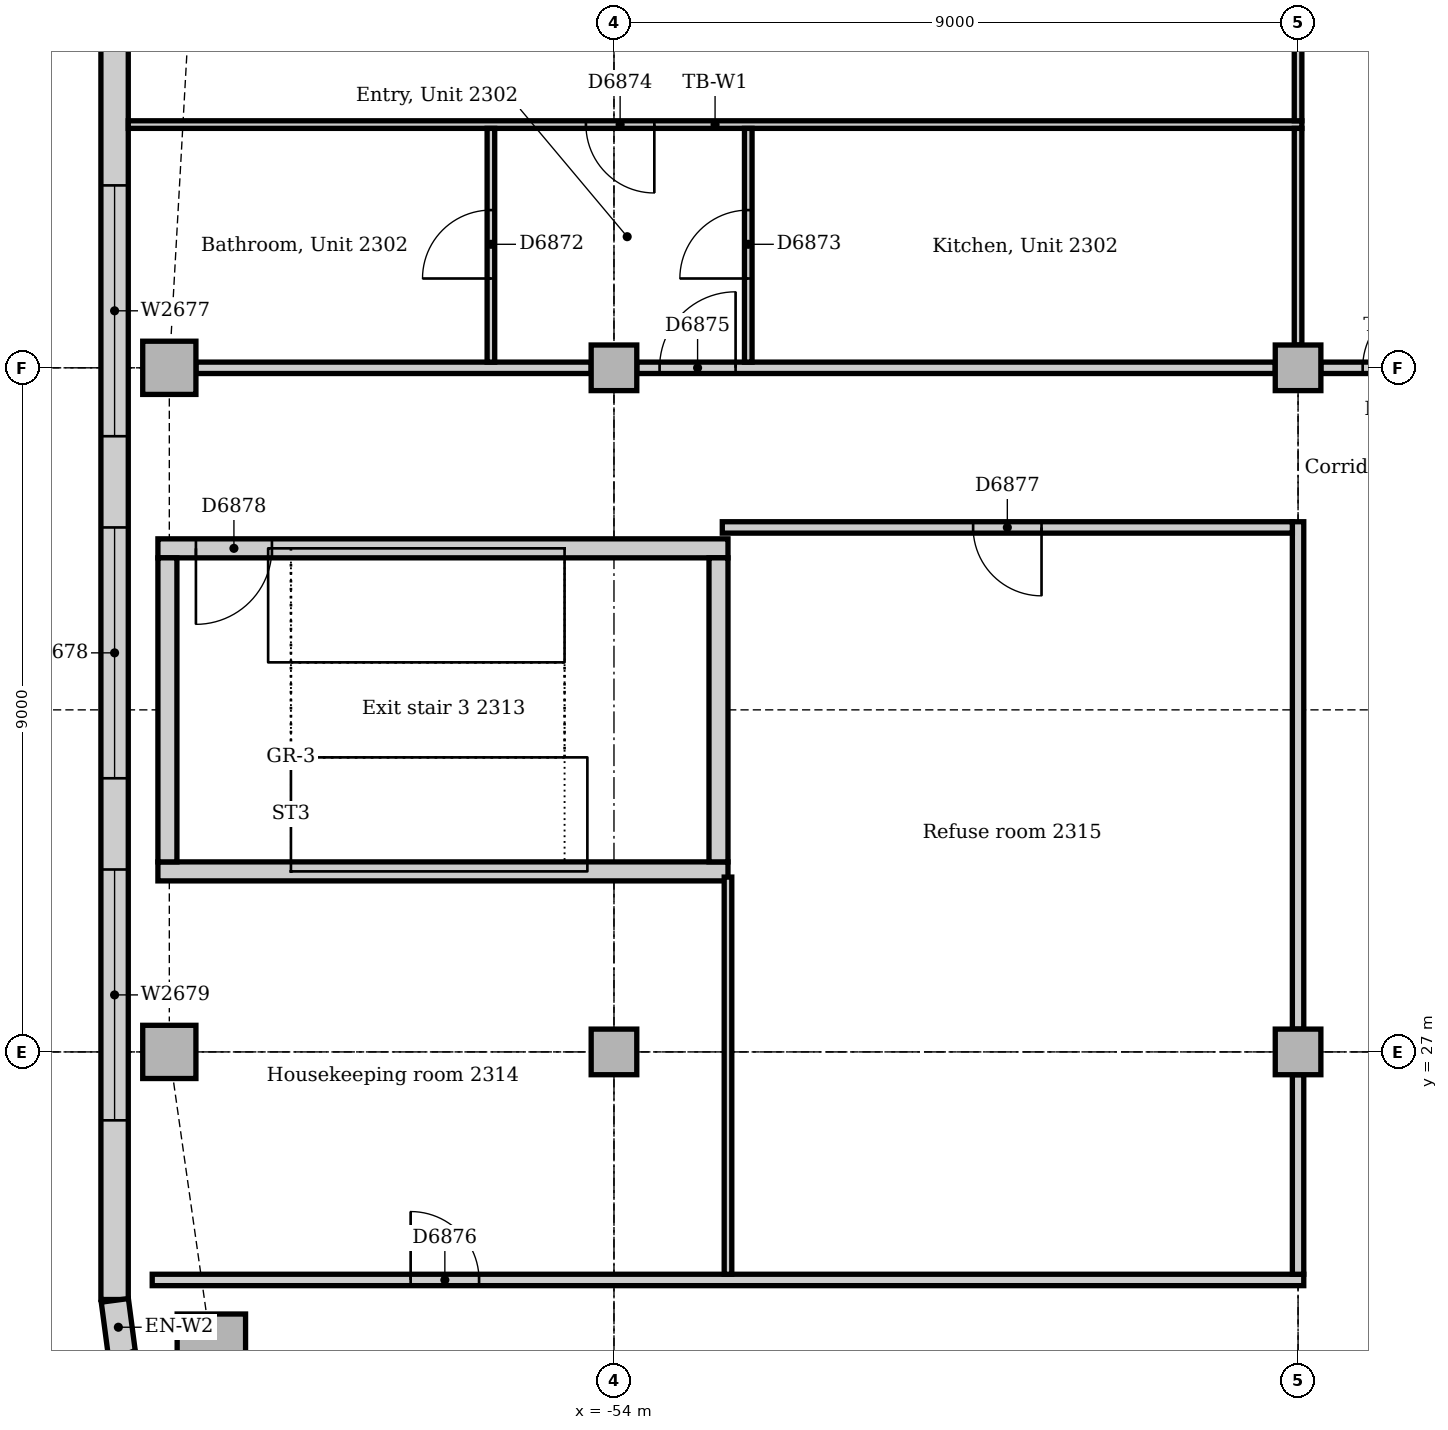
"""IFC4 building model, lengths in metres.
Left out: names, types, materials, properties, quantities, classifications, styles, units other than length and angle.
Written with IfcOpenShell. Run it as: python <this file> out.ifc"""

import sys

from ifc_helpers import new_model, si_unit, direction, frame, frame_2d, origin, origin_2d, place, context, subcontext, project, spatial, rectangle, extrude, element, fill, save


model = new_model("IFC4")
c1 = context("Model", 3, precision=1e-05, world=origin(), true_north=direction((0.0, 1.0)))
c2 = subcontext(c1, "Body", "Model", "MODEL_VIEW")
j1 = project(units=[si_unit("LENGTHUNIT", "METRE"), si_unit("PLANEANGLEUNIT", "RADIAN")], contexts=[c1])
p1 = place(None, origin())
s1 = spatial("IfcSite", under=j1, at=p1, CompositionType="ELEMENT")
p2 = place(p1, origin())
s2 = spatial("IfcBuilding", under=s1, at=p2, CompositionType="ELEMENT")
p3 = place(p2, frame((0.0, 0.0, 100.0)))
s3 = spatial("IfcBuildingStorey", under=s2, at=p3, CompositionType="ELEMENT", Elevation=100.0)
p4 = place(p3, frame((-60.0, 29.375, 0.0), z_axis=(0.0, 0.0, 1.0), x_axis=(1.0, 0.0, 0.0)))
e1 = element("IfcWall", 1, at=p4, inside=s3, PredefinedType="SOLIDWALL", context=c2, shape_type="SweptSolid", body=[
    extrude(rectangle(XDim=7.5, YDim=0.25, at=frame_2d((3.75, 0.0))), origin(), (0.0, 0.0, 1.0), 4.0),
])
p5 = place(p3, frame((-52.5, 33.625, 0.0), z_axis=(0.0, 0.0, 1.0), x_axis=(-1.0, 0.0, 0.0)))
e2 = element("IfcWall", 2, at=p5, inside=s3, PredefinedType="SOLIDWALL", context=c2, shape_type="SweptSolid", body=[
    extrude(rectangle(XDim=7.5, YDim=0.25, at=frame_2d((3.75, 0.0))), origin(), (0.0, 0.0, 1.0), 4.0),
])
p6 = place(p5, frame((6.0, 0.0, 0.0)))
e3 = element("IfcOpeningElement", 3, at=p6, cuts=e2, PredefinedType="OPENING", context=c2, shape_type="SweptSolid", body=[
    extrude(rectangle(XDim=1.0, YDim=2.1, at=frame_2d((0.5, 1.05))), frame((0.0, 0.135, 0.0), z_axis=(0.0, -1.0, 0.0), x_axis=(1.0, 0.0, 0.0)), (0.0, 0.0, 1.0), 0.27),
])
for number, where, z_axis, x_axis in (
    (4, (-52.625, 29.5, 0.0), (0.0, 0.0, 1.0), (0.0, 1.0, 0.0)),
    (5, (-59.875, 33.5, 0.0), (0.0, 0.0, 1.0), (0.0, -1.0, 0.0)),
):
    element("IfcWall", number, at=place(p3, frame(where, z_axis=z_axis, x_axis=x_axis)), inside=s3, PredefinedType="SOLIDWALL", context=c2, shape_type="SweptSolid", body=[
        extrude(rectangle(XDim=4.0, YDim=0.25, at=frame_2d((2.0, 0.0))), origin(), (0.0, 0.0, 1.0), 4.0),
    ])
p7 = place(p3, frame((-59.297, 23.102, -0.15), z_axis=(0.0, 0.0, 1.0), x_axis=(1.0, 0.0, 0.0)))
e6 = element("IfcColumn", 6, at=p7, inside=s3, PredefinedType="COLUMN", context=c2, shape_type="SweptSolid", body=[
    extrude(rectangle(XDim=0.9, YDim=0.9, at=origin_2d()), origin(), (0.0, 0.0, 1.0), 4.0),
])
for number, where, z_axis, x_axis in (
    (7, (-59.85, 27.0, -0.15), (0.0, 0.0, 1.0), (1.0, 0.0, 0.0)),
    (8, (-59.85, 36.0, -0.15), (0.0, 0.0, 1.0), (1.0, 0.0, 0.0)),
):
    element("IfcColumn", number, at=place(p3, frame(where, z_axis=z_axis, x_axis=x_axis)), inside=s3, PredefinedType="COLUMN", context=c2, shape_type="SweptSolid", body=[
        extrude(rectangle(XDim=0.7, YDim=0.7, at=origin_2d()), origin(), (0.0, 0.0, 1.0), 4.0),
    ])
for number, where, z_axis, x_axis in (
    (9, (-54.0, 27.0, 0.0), (0.0, 0.0, 1.0), (1.0, 0.0, 0.0)),
    (10, (-54.0, 36.0, 0.0), (0.0, 0.0, 1.0), (1.0, 0.0, 0.0)),
    (11, (-45.0, 27.0, 0.0), (0.0, 0.0, 1.0), (1.0, 0.0, 0.0)),
    (12, (-45.0, 36.0, 0.0), (0.0, 0.0, 1.0), (1.0, 0.0, 0.0)),
):
    element("IfcColumn", number, at=place(p3, frame(where, z_axis=z_axis, x_axis=x_axis)), inside=s3, PredefinedType="COLUMN", context=c2, shape_type="SweptSolid", body=[
        extrude(rectangle(XDim=0.6, YDim=0.6, at=origin_2d()), origin(), (0.0, 0.0, 1.0), 3.85),
    ])
p8 = place(p3, frame((-60.57, 45.257, 0.0), z_axis=(0.0, 0.0, 1.0), x_axis=(0.0, -1.0, 0.0)))
e13 = element("IfcWall", 13, at=p8, inside=s3, PredefinedType="STANDARD", context=c2, shape_type="SweptSolid", body=[
    extrude(rectangle(XDim=21.515, YDim=0.36, at=frame_2d((10.757, 0.0))), origin(), (0.0, 0.0, 1.0), 3.85),
])
p9 = place(p8, frame((3.107, 0.0, 0.0)))
e14 = element("IfcOpeningElement", 14, at=p9, cuts=e13, PredefinedType="OPENING", context=c2, shape_type="SweptSolid", body=[
    extrude(rectangle(XDim=1.8, YDim=2.4, at=frame_2d((0.9, 1.2))), frame((0.0, 0.19, 0.0), z_axis=(0.0, -1.0, 0.0), x_axis=(1.0, 0.0, 0.0)), (0.0, 0.0, 1.0), 0.38),
])
p10 = place(p8, frame((6.857, 0.0, 0.9)))
e15 = element("IfcOpeningElement", 15, at=p10, cuts=e13, PredefinedType="OPENING", context=c2, shape_type="SweptSolid", body=[
    extrude(rectangle(XDim=3.3, YDim=1.6, at=frame_2d((1.65, 0.8))), frame((0.0, 0.19, 0.0), z_axis=(0.0, -1.0, 0.0), x_axis=(1.0, 0.0, 0.0)), (0.0, 0.0, 1.0), 0.38),
])
p11 = place(p8, frame((11.357, 0.0, 0.9)))
e16 = element("IfcOpeningElement", 16, at=p11, cuts=e13, PredefinedType="OPENING", context=c2, shape_type="SweptSolid", body=[
    extrude(rectangle(XDim=3.3, YDim=1.6, at=frame_2d((1.65, 0.8))), frame((0.0, 0.19, 0.0), z_axis=(0.0, -1.0, 0.0), x_axis=(1.0, 0.0, 0.0)), (0.0, 0.0, 1.0), 0.38),
])
p12 = place(p8, frame((15.857, 0.0, 0.9)))
e17 = element("IfcOpeningElement", 17, at=p12, cuts=e13, PredefinedType="OPENING", context=c2, shape_type="SweptSolid", body=[
    extrude(rectangle(XDim=3.3, YDim=1.6, at=frame_2d((1.65, 0.8))), frame((0.0, 0.19, 0.0), z_axis=(0.0, -1.0, 0.0), x_axis=(1.0, 0.0, 0.0)), (0.0, 0.0, 1.0), 0.38),
])
p13 = place(p3, frame((-60.567, 23.731, 0.0), z_axis=(0.0, 0.0, 1.0), x_axis=(0.13055608231, -0.99144092581, 0.0)))
e18 = element("IfcWall", 18, at=p13, inside=s3, PredefinedType="STANDARD", context=c2, shape_type="SweptSolid", body=[
    extrude(rectangle(XDim=0.713, YDim=0.36, at=frame_2d((0.356, 0.0))), origin(), (0.0, 0.0, 1.0), 3.85),
])
p14 = place(p3, frame((-44.7, 36.0, 0.0), z_axis=(0.0, 0.0, 1.0), x_axis=(1.0, 0.0, 0.0)))
e19 = element("IfcWall", 19, at=p14, inside=s3, PredefinedType="PARTITIONING", context=c2, shape_type="SweptSolid", body=[
    extrude(rectangle(XDim=1.975, YDim=0.15, at=frame_2d((0.988, 0.0))), origin(), (0.0, 0.0, 1.0), 3.602),
])
p15 = place(p14, frame((0.55, 0.0, 0.0)))
e20 = element("IfcOpeningElement", 20, at=p15, cuts=e19, PredefinedType="OPENING", context=c2, shape_type="SweptSolid", body=[
    extrude(rectangle(XDim=0.9, YDim=2.1, at=frame_2d((0.45, 1.05))), frame((0.0, 0.085, 0.0), z_axis=(0.0, -1.0, 0.0), x_axis=(1.0, 0.0, 0.0)), (0.0, 0.0, 1.0), 0.17),
])
p16 = place(p3, frame((-53.7, 36.0, 0.0), z_axis=(0.0, 0.0, 1.0), x_axis=(1.0, 0.0, 0.0)))
e21 = element("IfcWall", 21, at=p16, inside=s3, PredefinedType="PARTITIONING", context=c2, shape_type="SweptSolid", body=[
    extrude(rectangle(XDim=8.4, YDim=0.15, at=frame_2d((4.2, 0.0))), origin(), (0.0, 0.0, 1.0), 3.262),
])
p17 = place(p16, frame((0.3, 0.0, 0.0)))
e22 = element("IfcOpeningElement", 22, at=p17, cuts=e21, PredefinedType="OPENING", context=c2, shape_type="SweptSolid", body=[
    extrude(rectangle(XDim=1.0, YDim=2.1, at=frame_2d((0.5, 1.05))), frame((0.0, 0.085, 0.0), z_axis=(0.0, -1.0, 0.0), x_axis=(1.0, 0.0, 0.0)), (0.0, 0.0, 1.0), 0.17),
])
p18 = place(p3, frame((-59.5, 36.0, 0.0), z_axis=(0.0, 0.0, 1.0), x_axis=(1.0, 0.0, 0.0)))
e23 = element("IfcWall", 23, at=p18, inside=s3, PredefinedType="PARTITIONING", context=c2, shape_type="SweptSolid", body=[
    extrude(rectangle(XDim=5.2, YDim=0.15, at=frame_2d((2.6, 0.0))), origin(), (0.0, 0.0, 1.0), 3.35),
])
p19 = place(p3, frame((-60.075, 24.0, 0.0), z_axis=(0.0, 0.0, 1.0), x_axis=(1.0, 0.0, 0.0)))
e24 = element("IfcWall", 24, at=p19, inside=s3, PredefinedType="PARTITIONING", context=c2, shape_type="SweptSolid", body=[
    extrude(rectangle(XDim=15.15, YDim=0.15, at=frame_2d((7.575, 0.0))), origin(), (0.0, 0.0, 1.0), 3.85),
])
p20 = place(p19, frame((3.4, 0.0, 0.0)))
e25 = element("IfcOpeningElement", 25, at=p20, cuts=e24, PredefinedType="OPENING", context=c2, shape_type="SweptSolid", body=[
    extrude(rectangle(XDim=0.9, YDim=2.1, at=frame_2d((0.45, 1.05))), frame((0.0, 0.085, 0.0), z_axis=(0.0, -1.0, 0.0), x_axis=(1.0, 0.0, 0.0)), (0.0, 0.0, 1.0), 0.17),
])
p21 = place(p3, frame((-45.0, 24.075, 0.0), z_axis=(0.0, 0.0, 1.0), x_axis=(0.0, 1.0, 0.0)))
e26 = element("IfcWall", 26, at=p21, inside=s3, PredefinedType="PARTITIONING", context=c2, shape_type="SweptSolid", body=[
    extrude(rectangle(XDim=2.625, YDim=0.15, at=frame_2d((1.312, 0.0))), origin(), (0.0, 0.0, 1.0), 3.362),
])
p22 = place(p3, frame((-45.0, 27.3, 0.0), z_axis=(0.0, 0.0, 1.0), x_axis=(0.0, 1.0, 0.0)))
e27 = element("IfcWall", 27, at=p22, inside=s3, PredefinedType="PARTITIONING", context=c2, shape_type="SweptSolid", body=[
    extrude(rectangle(XDim=6.675, YDim=0.15, at=frame_2d((3.337, 0.0))), origin(), (0.0, 0.0, 1.0), 3.362),
])
p23 = place(p3, frame((-52.575, 33.9, 0.0), z_axis=(0.0, 0.0, 1.0), x_axis=(1.0, 0.0, 0.0)))
e28 = element("IfcWall", 28, at=p23, inside=s3, PredefinedType="PARTITIONING", context=c2, shape_type="SweptSolid", body=[
    extrude(rectangle(XDim=7.5, YDim=0.15, at=frame_2d((3.75, 0.0))), origin(), (0.0, 0.0, 1.0), 3.85),
])
p24 = place(p23, frame((3.3, 0.0, 0.0)))
e29 = element("IfcOpeningElement", 29, at=p24, cuts=e28, PredefinedType="OPENING", context=c2, shape_type="SweptSolid", body=[
    extrude(rectangle(XDim=0.9, YDim=2.1, at=frame_2d((0.45, 1.05))), frame((0.0, 0.085, 0.0), z_axis=(0.0, -1.0, 0.0), x_axis=(1.0, 0.0, 0.0)), (0.0, 0.0, 1.0), 0.17),
])
p25 = place(p3, frame((-60.39, 39.2, 0.0), z_axis=(0.0, 0.0, 1.0), x_axis=(1.0, 0.0, 0.0)))
e30 = element("IfcWall", 30, at=p25, inside=s3, PredefinedType="PARTITIONING", context=c2, shape_type="SweptSolid", body=[
    extrude(rectangle(XDim=15.44, YDim=0.1, at=frame_2d((7.72, 0.0))), origin(), (0.0, 0.0, 1.0), 3.85),
])
p26 = place(p25, frame((6.021, 0.0, 0.0)))
e31 = element("IfcOpeningElement", 31, at=p26, cuts=e30, PredefinedType="OPENING", context=c2, shape_type="SweptSolid", body=[
    extrude(rectangle(XDim=0.9, YDim=2.1, at=frame_2d((0.45, 1.05))), frame((0.0, 0.06, 0.0), z_axis=(0.0, -1.0, 0.0), x_axis=(1.0, 0.0, 0.0)), (0.0, 0.0, 1.0), 0.12),
])
p27 = place(p3, frame((-45.0, 39.25, 0.0), z_axis=(0.0, 0.0, 1.0), x_axis=(0.0, 1.0, 0.0)))
e32 = element("IfcWall", 32, at=p27, inside=s3, PredefinedType="PARTITIONING", context=c2, shape_type="SweptSolid", body=[
    extrude(rectangle(XDim=6.8, YDim=0.1, at=frame_2d((3.4, 0.0))), origin(), (0.0, 0.0, 1.0), 3.362),
])
p28 = place(p3, frame((-45.0, 36.3, 0.0), z_axis=(0.0, 0.0, 1.0), x_axis=(0.0, 1.0, 0.0)))
e33 = element("IfcWall", 33, at=p28, inside=s3, PredefinedType="PARTITIONING", context=c2, shape_type="SweptSolid", body=[
    extrude(rectangle(XDim=2.85, YDim=0.1, at=frame_2d((1.425, 0.0))), origin(), (0.0, 0.0, 1.0), 3.362),
])
p29 = place(p3, frame((-52.5, 24.075, 0.0), z_axis=(0.0, 0.0, 1.0), x_axis=(0.0, 1.0, 0.0)))
e34 = element("IfcWall", 34, at=p29, inside=s3, PredefinedType="PARTITIONING", context=c2, shape_type="SweptSolid", body=[
    extrude(rectangle(XDim=5.225, YDim=0.1, at=frame_2d((2.612, 0.0))), origin(), (0.0, 0.0, 1.0), 3.85),
])
p30 = place(p3, frame((-55.619, 36.075, 0.0), z_axis=(0.0, 0.0, 1.0), x_axis=(0.0, 1.0, 0.0)))
e35 = element("IfcWall", 35, at=p30, inside=s3, PredefinedType="PARTITIONING", context=c2, shape_type="SweptSolid", body=[
    extrude(rectangle(XDim=3.075, YDim=0.1, at=frame_2d((1.538, 0.0))), origin(), (0.0, 0.0, 1.0), 3.85),
])
p31 = place(p30, frame((1.1, 0.0, 0.0)))
e36 = element("IfcOpeningElement", 36, at=p31, cuts=e35, PredefinedType="OPENING", context=c2, shape_type="SweptSolid", body=[
    extrude(rectangle(XDim=0.9, YDim=2.1, at=frame_2d((0.45, 1.05))), frame((0.0, 0.06, 0.0), z_axis=(0.0, -1.0, 0.0), x_axis=(1.0, 0.0, 0.0)), (0.0, 0.0, 1.0), 0.12),
])
p32 = place(p3, frame((-52.233, 36.075, 0.0), z_axis=(0.0, 0.0, 1.0), x_axis=(0.0, 1.0, 0.0)))
e37 = element("IfcWall", 37, at=p32, inside=s3, PredefinedType="PARTITIONING", context=c2, shape_type="SweptSolid", body=[
    extrude(rectangle(XDim=3.075, YDim=0.1, at=frame_2d((1.538, 0.0))), origin(), (0.0, 0.0, 1.0), 3.85),
])
p33 = place(p32, frame((1.1, 0.0, 0.0)))
e38 = element("IfcOpeningElement", 38, at=p33, cuts=e37, PredefinedType="OPENING", context=c2, shape_type="SweptSolid", body=[
    extrude(rectangle(XDim=0.9, YDim=2.1, at=frame_2d((0.45, 1.05))), frame((0.0, 0.06, 0.0), z_axis=(0.0, -1.0, 0.0), x_axis=(1.0, 0.0, 0.0)), (0.0, 0.0, 1.0), 0.12),
])
p34 = place(p10, origin())
e39 = element("IfcWindow", 39, at=p34, inside=s3, PartitioningType="SINGLE_PANEL", PredefinedType="WINDOW", context=c2, shape_type="SweptSolid", body=[
    extrude(rectangle(XDim=3.3, YDim=1.6, at=frame_2d((1.65, 0.8))), frame((0.0, 0.13, 0.0), z_axis=(0.0, -1.0, 0.0), x_axis=(1.0, 0.0, 0.0)), (0.0, 0.0, 1.0), 0.06),
])
fill(e15, e39)
p35 = place(p11, origin())
e40 = element("IfcWindow", 40, at=p35, inside=s3, PartitioningType="SINGLE_PANEL", PredefinedType="WINDOW", context=c2, shape_type="SweptSolid", body=[
    extrude(rectangle(XDim=3.3, YDim=1.6, at=frame_2d((1.65, 0.8))), frame((0.0, 0.13, 0.0), z_axis=(0.0, -1.0, 0.0), x_axis=(1.0, 0.0, 0.0)), (0.0, 0.0, 1.0), 0.06),
])
fill(e16, e40)
p36 = place(p12, origin())
e41 = element("IfcWindow", 41, at=p36, inside=s3, PartitioningType="SINGLE_PANEL", PredefinedType="WINDOW", context=c2, shape_type="SweptSolid", body=[
    extrude(rectangle(XDim=3.3, YDim=1.6, at=frame_2d((1.65, 0.8))), frame((0.0, 0.13, 0.0), z_axis=(0.0, -1.0, 0.0), x_axis=(1.0, 0.0, 0.0)), (0.0, 0.0, 1.0), 0.06),
])
fill(e17, e41)
p37 = place(p15, origin())
e42 = element("IfcDoor", 42, at=p37, inside=s3, OperationType="SINGLE_SWING_RIGHT", PredefinedType="DOOR", context=c2, shape_type="SweptSolid", body=[
    extrude(rectangle(XDim=0.9, YDim=2.1, at=frame_2d((0.45, 1.05))), frame((0.0, 0.025, 0.0), z_axis=(0.0, -1.0, 0.0), x_axis=(1.0, 0.0, 0.0)), (0.0, 0.0, 1.0), 0.05),
])
fill(e20, e42)
p38 = place(p31, origin())
e43 = element("IfcDoor", 43, at=p38, inside=s3, OperationType="SINGLE_SWING_LEFT", PredefinedType="DOOR", context=c2, shape_type="SweptSolid", body=[
    extrude(rectangle(XDim=0.9, YDim=2.1, at=frame_2d((0.45, 1.05))), frame((0.0, 0.025, 0.0), z_axis=(0.0, -1.0, 0.0), x_axis=(1.0, 0.0, 0.0)), (0.0, 0.0, 1.0), 0.05),
])
fill(e36, e43)
p39 = place(p33, origin())
e44 = element("IfcDoor", 44, at=p39, inside=s3, OperationType="SINGLE_SWING_LEFT", PredefinedType="DOOR", context=c2, shape_type="SweptSolid", body=[
    extrude(rectangle(XDim=0.9, YDim=2.1, at=frame_2d((0.45, 1.05))), frame((0.0, 0.025, 0.0), z_axis=(0.0, -1.0, 0.0), x_axis=(1.0, 0.0, 0.0)), (0.0, 0.0, 1.0), 0.05),
])
fill(e38, e44)
p40 = place(p26, frame((0.9, 0.0, 0.0), z_axis=(0.0, 0.0, 1.0), x_axis=(-1.0, 0.0, 0.0)))
e45 = element("IfcDoor", 45, at=p40, inside=s3, OperationType="SINGLE_SWING_LEFT", PredefinedType="DOOR", context=c2, shape_type="SweptSolid", body=[
    extrude(rectangle(XDim=0.9, YDim=2.1, at=frame_2d((0.45, 1.05))), frame((0.0, 0.025, 0.0), z_axis=(0.0, -1.0, 0.0), x_axis=(1.0, 0.0, 0.0)), (0.0, 0.0, 1.0), 0.05),
])
fill(e31, e45)
p41 = place(p17, origin())
e46 = element("IfcDoor", 46, at=p41, inside=s3, OperationType="SINGLE_SWING_RIGHT", PredefinedType="DOOR", context=c2, shape_type="SweptSolid", body=[
    extrude(rectangle(XDim=1.0, YDim=2.1, at=frame_2d((0.5, 1.05))), frame((0.0, 0.025, 0.0), z_axis=(0.0, -1.0, 0.0), x_axis=(1.0, 0.0, 0.0)), (0.0, 0.0, 1.0), 0.05),
])
fill(e22, e46)
p42 = place(p20, origin())
e47 = element("IfcDoor", 47, at=p42, inside=s3, OperationType="SINGLE_SWING_LEFT", PredefinedType="DOOR", context=c2, shape_type="SweptSolid", body=[
    extrude(rectangle(XDim=0.9, YDim=2.1, at=frame_2d((0.45, 1.05))), frame((0.0, 0.025, 0.0), z_axis=(0.0, -1.0, 0.0), x_axis=(1.0, 0.0, 0.0)), (0.0, 0.0, 1.0), 0.05),
])
fill(e25, e47)
p43 = place(p24, frame((0.9, 0.0, 0.0), z_axis=(0.0, 0.0, 1.0), x_axis=(-1.0, 0.0, 0.0)))
e48 = element("IfcDoor", 48, at=p43, inside=s3, OperationType="SINGLE_SWING_LEFT", PredefinedType="DOOR", context=c2, shape_type="SweptSolid", body=[
    extrude(rectangle(XDim=0.9, YDim=2.1, at=frame_2d((0.45, 1.05))), frame((0.0, 0.025, 0.0), z_axis=(0.0, -1.0, 0.0), x_axis=(1.0, 0.0, 0.0)), (0.0, 0.0, 1.0), 0.05),
])
fill(e29, e48)
p44 = place(p6, origin())
e49 = element("IfcDoor", 49, at=p44, inside=s3, OperationType="SINGLE_SWING_RIGHT", PredefinedType="DOOR", context=c2, shape_type="SweptSolid", body=[
    extrude(rectangle(XDim=1.0, YDim=2.1, at=frame_2d((0.5, 1.05))), frame((0.0, 0.025, 0.0), z_axis=(0.0, -1.0, 0.0), x_axis=(1.0, 0.0, 0.0)), (0.0, 0.0, 1.0), 0.05),
])
fill(e3, e49)
save(model, sys.argv[1])
